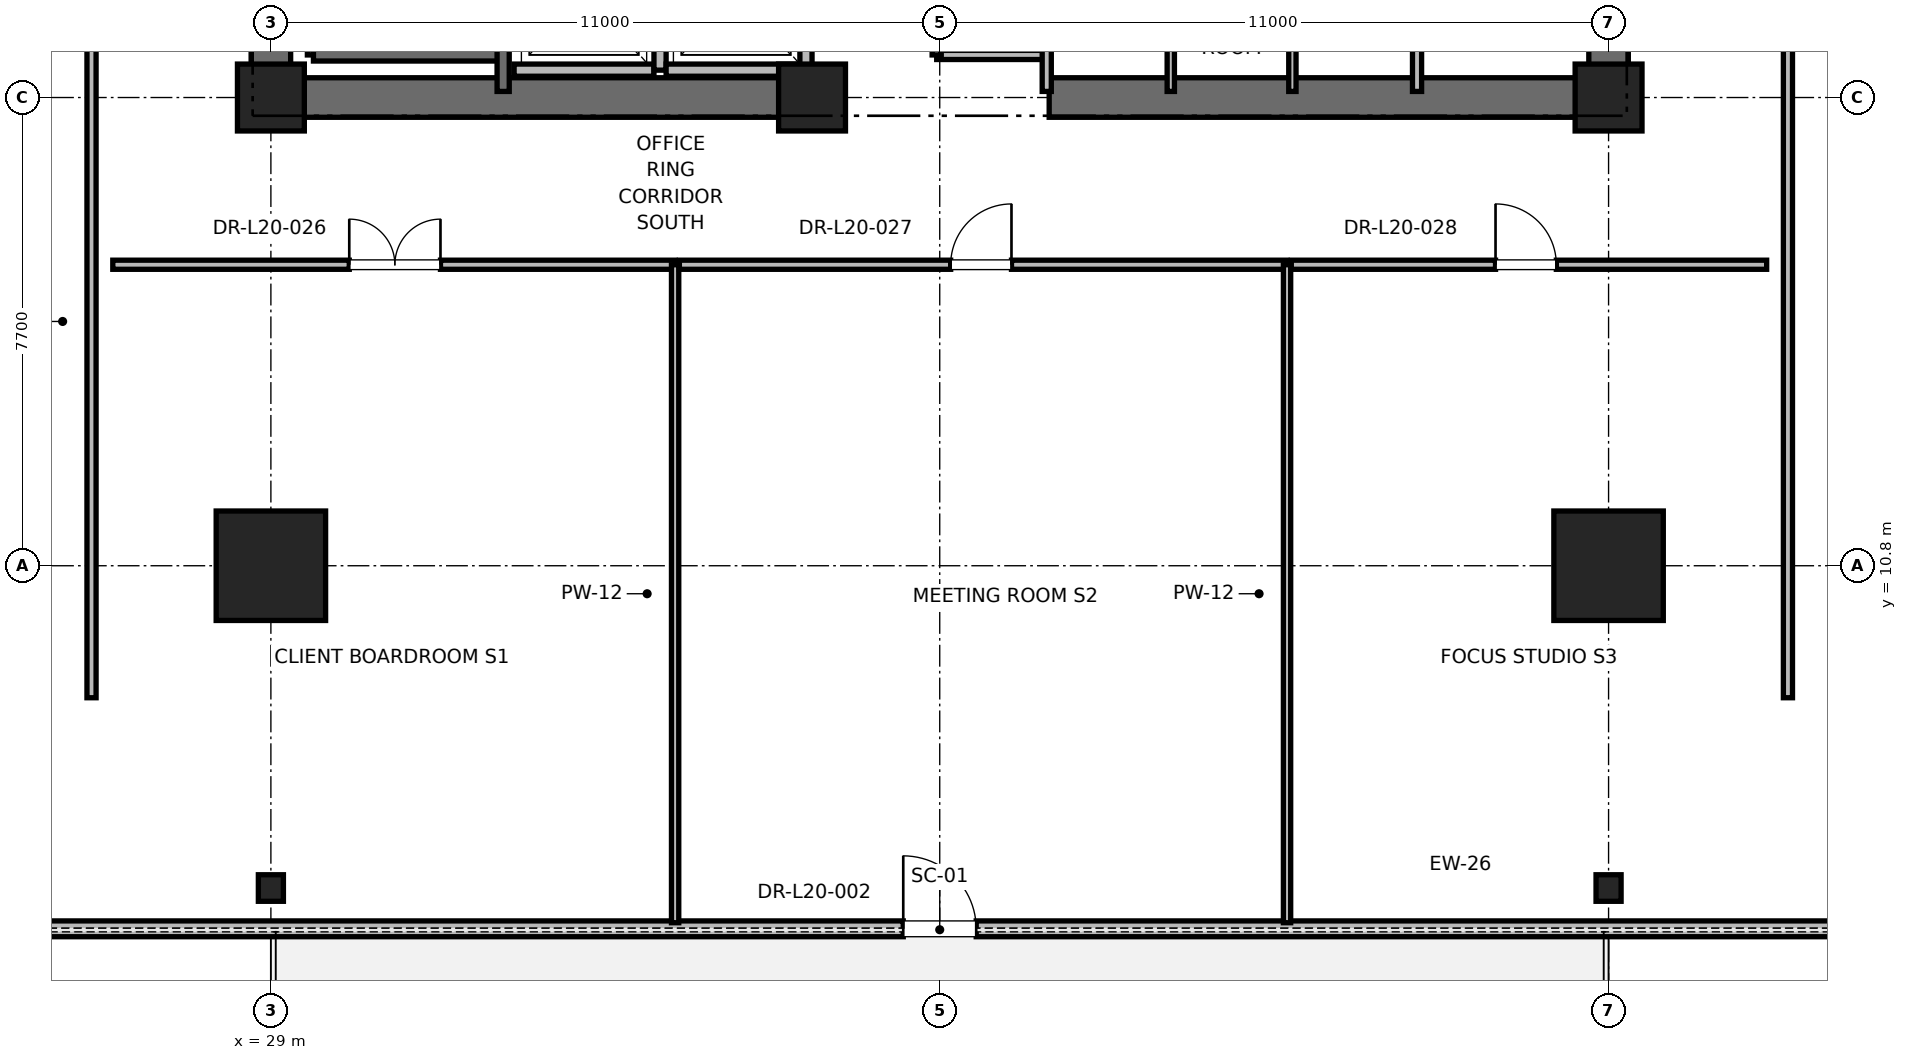
"""IFC4 building model, lengths in metres.
Left out: names, types, materials, properties, quantities, classifications, styles, units other than length and angle.
Written with IfcOpenShell. Run it as: python <this file> out.ifc"""

import sys

from ifc_helpers import new_model, si_unit, direction, frame, frame_2d, origin, origin_2d, place, context, subcontext, project, spatial, rectangle, i_section, extrude, element, fill, save


model = new_model("IFC4")
c1 = context("Model", 3, precision=1e-05, world=origin(), true_north=direction((0.0, 1.0)))
c2 = subcontext(c1, "Body", "Model", "MODEL_VIEW")
j1 = project(units=[si_unit("LENGTHUNIT", "METRE"), si_unit("PLANEANGLEUNIT", "RADIAN")], contexts=[c1])
p1 = place(None, origin())
s1 = spatial("IfcSite", under=j1, at=p1, CompositionType="ELEMENT")
p2 = place(p1, origin())
s2 = spatial("IfcBuilding", under=s1, at=p2, CompositionType="ELEMENT")
p3 = place(p2, frame((0.0, 0.0, 87.6)))
s3 = spatial("IfcBuildingStorey", under=s2, at=p3, CompositionType="ELEMENT", Elevation=87.6)
for number, where, z_axis, x_axis in (
    (1, (29.0, 10.8, 0.0), (0.0, 0.0, 1.0), (1.0, 0.0, 0.0)),
    (2, (51.0, 10.8, 0.0), (0.0, 0.0, 1.0), (1.0, 0.0, 0.0)),
):
    element("IfcColumn", number, at=place(p3, frame(where, z_axis=z_axis, x_axis=x_axis)), inside=s3, PredefinedType="COLUMN", context=c2, shape_type="SweptSolid", body=[
        extrude(rectangle(XDim=1.8, YDim=1.8, at=origin_2d()), origin(), (0.0, 0.0, 1.0), 4.0),
    ])
for number, where, z_axis, x_axis in (
    (3, (29.0, 5.5, 0.0), (0.0, 0.0, 1.0), (1.0, 0.0, 0.0)),
    (4, (51.0, 5.5, 0.0), (0.0, 0.0, 1.0), (1.0, 0.0, 0.0)),
):
    element("IfcColumn", number, at=place(p3, frame(where, z_axis=z_axis, x_axis=x_axis)), inside=s3, PredefinedType="COLUMN", context=c2, shape_type="SweptSolid", body=[
        extrude(i_section(OverallWidth=0.412, OverallDepth=0.437, WebThickness=0.036, FlangeThickness=0.058, FilletRadius=0.015, at=origin_2d()), origin(), (0.0, 0.0, 1.0), 4.0),
    ])
for number, where, z_axis, x_axis in (
    (5, (29.0, 18.5, 0.0), (0.0, 0.0, 1.0), (1.0, 0.0, 0.0)),
    (6, (51.0, 18.5, 0.0), (0.0, 0.0, 1.0), (1.0, 0.0, 0.0)),
    (7, (37.9, 18.5, 0.0), (0.0, 0.0, 1.0), (1.0, 0.0, 0.0)),
):
    element("IfcColumn", number, at=place(p3, frame(where, z_axis=z_axis, x_axis=x_axis)), inside=s3, PredefinedType="PILASTER", context=c2, shape_type="SweptSolid", body=[
        extrude(rectangle(XDim=1.1, YDim=1.1, at=origin_2d()), origin(), (0.0, 0.0, 1.0), 4.0),
    ])
for number, where, z_axis, x_axis in (
    (8, (29.0, 18.5, 0.0), (0.0, 0.0, 1.0), (1.0, 0.0, 0.0)),
    (9, (41.8, 18.5, 0.0), (0.0, 0.0, 1.0), (1.0, 0.0, 0.0)),
):
    element("IfcWall", number, at=place(p3, frame(where, z_axis=z_axis, x_axis=x_axis)), inside=s3, PredefinedType="SHEAR", context=c2, shape_type="SweptSolid", body=[
        extrude(rectangle(XDim=9.2, YDim=0.65, at=frame_2d((4.6, 0.0))), origin(), (0.0, 0.0, 1.0), 3.76),
    ])
p4 = place(p3, frame((29.0, 18.5, 0.0), z_axis=(0.0, 0.0, 1.0), x_axis=(0.0, 1.0, 0.0)))
e10 = element("IfcWall", 10, at=p4, inside=s3, PredefinedType="SHEAR", context=c2, shape_type="SweptSolid", body=[
    extrude(rectangle(XDim=8.8, YDim=0.65, at=frame_2d((4.4, 0.0))), origin(), (0.0, 0.0, 1.0), 3.76),
])
p5 = place(p3, frame((51.0, 18.5, 0.0), z_axis=(0.0, 0.0, 1.0), x_axis=(0.0, 1.0, 0.0)))
e11 = element("IfcWall", 11, at=p5, inside=s3, PredefinedType="SHEAR", context=c2, shape_type="SweptSolid", body=[
    extrude(rectangle(XDim=5.8, YDim=0.65, at=frame_2d((2.9, 0.0))), origin(), (0.0, 0.0, 1.0), 3.76),
])
p6 = place(p3, frame((17.47, 4.829, 0.0), z_axis=(0.0, 0.0, 1.0), x_axis=(1.0, 0.0, 0.0)))
e12 = element("IfcWall", 12, at=p6, inside=s3, PredefinedType="PARAPET", context=c2, shape_type="SweptSolid", body=[
    extrude(rectangle(XDim=45.06, YDim=0.26, at=frame_2d((22.53, 0.0))), origin(), (0.0, 0.0, 1.0), 3.273),
])
p7 = place(p6, frame((4.2, 0.0, 0.85)))
e13 = element("IfcOpeningElement", 13, at=p7, cuts=e12, PredefinedType="OPENING", context=c2, shape_type="SweptSolid", body=[
    extrude(rectangle(XDim=1.8, YDim=2.2, at=frame_2d((0.9, 1.1))), frame((0.0, 0.13, 0.0), z_axis=(0.0, -1.0, 0.0), x_axis=(1.0, 0.0, 0.0)), (0.0, 0.0, 1.0), 0.26),
])
p8 = place(p6, frame((21.93, 0.0, 0.0)))
e14 = element("IfcOpeningElement", 14, at=p8, cuts=e12, PredefinedType="OPENING", context=c2, shape_type="SweptSolid", body=[
    extrude(rectangle(XDim=1.2, YDim=2.2, at=frame_2d((0.6, 1.1))), frame((0.0, 0.13, 0.0), z_axis=(0.0, -1.0, 0.0), x_axis=(1.0, 0.0, 0.0)), (0.0, 0.0, 1.0), 0.26),
])
p9 = place(p6, frame((39.06, 0.0, 0.85)))
e15 = element("IfcOpeningElement", 15, at=p9, cuts=e12, PredefinedType="OPENING", context=c2, shape_type="SweptSolid", body=[
    extrude(rectangle(XDim=1.8, YDim=2.2, at=frame_2d((0.9, 1.1))), frame((0.0, 0.13, 0.0), z_axis=(0.0, -1.0, 0.0), x_axis=(1.0, 0.0, 0.0)), (0.0, 0.0, 1.0), 0.26),
])
p10 = place(p3, frame((29.7, 19.2, 0.0), z_axis=(0.0, 0.0, 1.0), x_axis=(0.0, 1.0, 0.0)))
e16 = element("IfcWall", 16, at=p10, inside=s3, PredefinedType="SOLIDWALL", context=c2, shape_type="SweptSolid", body=[
    extrude(rectangle(XDim=8.15, YDim=0.2, at=frame_2d((4.075, 0.0))), origin(), (0.0, 0.0, 1.0), 3.76),
])
p11 = place(p3, frame((29.7, 19.2, 0.0), z_axis=(0.0, 0.0, 1.0), x_axis=(1.0, 0.0, 0.0)))
e17 = element("IfcWall", 17, at=p11, inside=s3, PredefinedType="SOLIDWALL", context=c2, shape_type="SweptSolid", body=[
    extrude(rectangle(XDim=3.12, YDim=0.2, at=frame_2d((1.56, 0.0))), origin(), (0.0, 0.0, 1.0), 3.76),
])
p12 = place(p3, frame((32.82, 18.6, 0.0), z_axis=(0.0, 0.0, 1.0), x_axis=(0.0, 1.0, 0.0)))
e18 = element("IfcWall", 18, at=p12, inside=s3, PredefinedType="SOLIDWALL", context=c2, shape_type="SweptSolid", body=[
    extrude(rectangle(XDim=8.78, YDim=0.2, at=frame_2d((4.39, 0.0))), origin(), (0.0, 0.0, 1.0), 3.76),
])
p13 = place(p3, frame((33.0, 18.95, 0.0), z_axis=(0.0, 0.0, 1.0), x_axis=(1.0, 0.0, 0.0)))
e19 = element("IfcWall", 19, at=p13, inside=s3, PredefinedType="SOLIDWALL", context=c2, shape_type="SweptSolid", body=[
    extrude(rectangle(XDim=2.3, YDim=0.2, at=frame_2d((1.15, 0.0))), origin(), (0.0, 0.0, 1.0), 3.76),
])
p14 = place(p3, frame((35.4, 18.95, 0.0), z_axis=(0.0, 0.0, 1.0), x_axis=(0.0, 1.0, 0.0)))
e20 = element("IfcWall", 20, at=p14, inside=s3, PredefinedType="SOLIDWALL", context=c2, shape_type="SweptSolid", body=[
    extrude(rectangle(XDim=2.6, YDim=0.2, at=frame_2d((1.3, 0.0))), origin(), (0.0, 0.0, 1.0), 3.76),
])
p15 = place(p3, frame((35.5, 18.95, 0.0), z_axis=(0.0, 0.0, 1.0), x_axis=(1.0, 0.0, 0.0)))
e21 = element("IfcWall", 21, at=p15, inside=s3, PredefinedType="SOLIDWALL", context=c2, shape_type="SweptSolid", body=[
    extrude(rectangle(XDim=2.3, YDim=0.2, at=frame_2d((1.15, 0.0))), origin(), (0.0, 0.0, 1.0), 2.54),
])
p16 = place(p3, frame((37.8, 18.95, 0.0), z_axis=(0.0, 0.0, 1.0), x_axis=(0.0, 1.0, 0.0)))
e22 = element("IfcWall", 22, at=p16, inside=s3, PredefinedType="SOLIDWALL", context=c2, shape_type="SweptSolid", body=[
    extrude(rectangle(XDim=2.6, YDim=0.2, at=frame_2d((1.3, 0.0))), origin(), (0.0, 0.0, 1.0), 2.54),
])
p17 = place(p3, frame((39.95, 19.2, 0.0), z_axis=(0.0, 0.0, 1.0), x_axis=(1.0, 0.0, 0.0)))
e23 = element("IfcWall", 23, at=p17, inside=s3, PredefinedType="PARTITIONING", context=c2, shape_type="SweptSolid", body=[
    extrude(rectangle(XDim=1.81, YDim=0.15, at=frame_2d((0.905, 0.0))), origin(), (0.0, 0.0, 1.0), 2.85),
])
p18 = place(p3, frame((41.76, 18.6, 0.0), z_axis=(0.0, 0.0, 1.0), x_axis=(0.0, 1.0, 0.0)))
e24 = element("IfcWall", 24, at=p18, inside=s3, PredefinedType="PARTITIONING", context=c2, shape_type="SweptSolid", body=[
    extrude(rectangle(XDim=3.6, YDim=0.15, at=frame_2d((1.8, 0.0))), origin(), (0.0, 0.0, 1.0), 2.54),
])
p19 = place(p3, frame((39.95, 19.2, 0.0), z_axis=(0.0, 0.0, 1.0), x_axis=(0.0, 1.0, 0.0)))
e25 = element("IfcWall", 25, at=p19, inside=s3, PredefinedType="PARTITIONING", context=c2, shape_type="SweptSolid", body=[
    extrude(rectangle(XDim=3.0, YDim=0.15, at=frame_2d((1.5, 0.0))), origin(), (0.0, 0.0, 1.0), 2.85),
])
p20 = place(p19, frame((1.05, 0.0, 0.0)))
e26 = element("IfcOpeningElement", 26, at=p20, cuts=e25, PredefinedType="OPENING", context=c2, shape_type="SweptSolid", body=[
    extrude(rectangle(XDim=0.9, YDim=2.1, at=frame_2d((0.45, 1.05))), frame((0.0, 0.075, 0.0), z_axis=(0.0, -1.0, 0.0), x_axis=(1.0, 0.0, 0.0)), (0.0, 0.0, 1.0), 0.15),
])
p21 = place(p3, frame((47.85, 18.6, 0.0), z_axis=(0.0, 0.0, 1.0), x_axis=(0.0, 1.0, 0.0)))
e27 = element("IfcWall", 27, at=p21, inside=s3, PredefinedType="PARTITIONING", context=c2, shape_type="SweptSolid", body=[
    extrude(rectangle(XDim=2.54, YDim=0.15, at=frame_2d((1.27, 0.0))), origin(), (0.0, 0.0, 1.0), 2.85),
])
for number, where, z_axis, x_axis in (
    (28, (43.8, 18.6, 0.0), (0.0, 0.0, 1.0), (0.0, 1.0, 0.0)),
    (29, (45.8, 18.6, 0.0), (0.0, 0.0, 1.0), (0.0, 1.0, 0.0)),
):
    element("IfcWall", number, at=place(p3, frame(where, z_axis=z_axis, x_axis=x_axis)), inside=s3, PredefinedType="PARTITIONING", context=c2, shape_type="SweptSolid", body=[
        extrude(rectangle(XDim=3.02, YDim=0.12, at=frame_2d((1.51, 0.0))), origin(), (0.0, 0.0, 1.0), 2.85),
    ])
p22 = place(p3, frame((26.4, 15.75, 0.0), z_axis=(0.0, 0.0, 1.0), x_axis=(1.0, 0.0, 0.0)))
e30 = element("IfcWall", 30, at=p22, inside=s3, PredefinedType="PARTITIONING", context=c2, shape_type="SweptSolid", body=[
    extrude(rectangle(XDim=9.248, YDim=0.15, at=frame_2d((4.624, 0.0))), origin(), (0.0, 0.0, 1.0), 2.85),
])
p23 = place(p22, frame((3.889, 0.0, 0.0)))
e31 = element("IfcOpeningElement", 31, at=p23, cuts=e30, PredefinedType="OPENING", context=c2, shape_type="SweptSolid", body=[
    extrude(rectangle(XDim=1.5, YDim=2.25, at=frame_2d((0.75, 1.125))), frame((0.0, 0.075, 0.0), z_axis=(0.0, -1.0, 0.0), x_axis=(1.0, 0.0, 0.0)), (0.0, 0.0, 1.0), 0.15),
])
p24 = place(p3, frame((35.648, 4.929, 0.0), z_axis=(0.0, 0.0, 1.0), x_axis=(0.0, 1.0, 0.0)))
e32 = element("IfcWall", 32, at=p24, inside=s3, PredefinedType="PARTITIONING", context=c2, shape_type="SweptSolid", body=[
    extrude(rectangle(XDim=10.821, YDim=0.12, at=frame_2d((5.41, 0.0))), origin(), (0.0, 0.0, 1.0), 2.39),
])
p25 = place(p3, frame((35.718, 15.75, 0.0), z_axis=(0.0, 0.0, 1.0), x_axis=(1.0, 0.0, 0.0)))
e33 = element("IfcWall", 33, at=p25, inside=s3, PredefinedType="PARTITIONING", context=c2, shape_type="SweptSolid", body=[
    extrude(rectangle(XDim=9.994, YDim=0.15, at=frame_2d((4.997, 0.0))), origin(), (0.0, 0.0, 1.0), 2.85),
])
p26 = place(p25, frame((4.462, 0.0, 0.0)))
e34 = element("IfcOpeningElement", 34, at=p26, cuts=e33, PredefinedType="OPENING", context=c2, shape_type="SweptSolid", body=[
    extrude(rectangle(XDim=1.0, YDim=2.15, at=frame_2d((0.5, 1.075))), frame((0.0, 0.075, 0.0), z_axis=(0.0, -1.0, 0.0), x_axis=(1.0, 0.0, 0.0)), (0.0, 0.0, 1.0), 0.15),
])
p27 = place(p3, frame((45.712, 4.929, 0.0), z_axis=(0.0, 0.0, 1.0), x_axis=(0.0, 1.0, 0.0)))
e35 = element("IfcWall", 35, at=p27, inside=s3, PredefinedType="PARTITIONING", context=c2, shape_type="SweptSolid", body=[
    extrude(rectangle(XDim=10.821, YDim=0.12, at=frame_2d((5.41, 0.0))), origin(), (0.0, 0.0, 1.0), 2.39),
])
p28 = place(p3, frame((45.782, 15.75, 0.0), z_axis=(0.0, 0.0, 1.0), x_axis=(1.0, 0.0, 0.0)))
e36 = element("IfcWall", 36, at=p28, inside=s3, PredefinedType="PARTITIONING", context=c2, shape_type="SweptSolid", body=[
    extrude(rectangle(XDim=7.818, YDim=0.15, at=frame_2d((3.909, 0.0))), origin(), (0.0, 0.0, 1.0), 2.85),
])
p29 = place(p28, frame((3.359, 0.0, 0.0)))
e37 = element("IfcOpeningElement", 37, at=p29, cuts=e36, PredefinedType="OPENING", context=c2, shape_type="SweptSolid", body=[
    extrude(rectangle(XDim=1.0, YDim=2.15, at=frame_2d((0.5, 1.075))), frame((0.0, 0.075, 0.0), z_axis=(0.0, -1.0, 0.0), x_axis=(1.0, 0.0, 0.0)), (0.0, 0.0, 1.0), 0.15),
])
p30 = place(p3, frame((26.05, 8.629, 0.0), z_axis=(0.0, 0.0, 1.0), x_axis=(0.0, 1.0, 0.0)))
e38 = element("IfcWall", 38, at=p30, inside=s3, PredefinedType="PARTITIONING", context=c2, shape_type="SweptSolid", body=[
    extrude(rectangle(XDim=15.852, YDim=0.15, at=frame_2d((7.926, 0.0))), origin(), (0.0, 0.0, 1.0), 2.85),
])
p31 = place(p30, frame((12.376, 0.0, 0.0)))
e39 = element("IfcOpeningElement", 39, at=p31, cuts=e38, PredefinedType="OPENING", context=c2, shape_type="SweptSolid", body=[
    extrude(rectangle(XDim=1.0, YDim=2.15, at=frame_2d((0.5, 1.075))), frame((0.0, 0.075, 0.0), z_axis=(0.0, -1.0, 0.0), x_axis=(1.0, 0.0, 0.0)), (0.0, 0.0, 1.0), 0.15),
])
p32 = place(p3, frame((53.95, 8.629, 0.0), z_axis=(0.0, 0.0, 1.0), x_axis=(0.0, 1.0, 0.0)))
e40 = element("IfcWall", 40, at=p32, inside=s3, PredefinedType="PARTITIONING", context=c2, shape_type="SweptSolid", body=[
    extrude(rectangle(XDim=21.89, YDim=0.15, at=frame_2d((10.945, 0.0))), origin(), (0.0, 0.0, 1.0), 2.85),
])
p33 = place(p32, frame((15.396, 0.0, 0.0)))
e41 = element("IfcOpeningElement", 41, at=p33, cuts=e40, PredefinedType="OPENING", context=c2, shape_type="SweptSolid", body=[
    extrude(rectangle(XDim=1.0, YDim=2.15, at=frame_2d((0.5, 1.075))), frame((0.0, 0.075, 0.0), z_axis=(0.0, -1.0, 0.0), x_axis=(1.0, 0.0, 0.0)), (0.0, 0.0, 1.0), 0.15),
])
p34 = place(p8, origin())
e42 = element("IfcDoor", 42, at=p34, inside=s3, OperationType="SINGLE_SWING_LEFT", PredefinedType="DOOR", context=c2, shape_type="SweptSolid", body=[
    extrude(rectangle(XDim=1.2, YDim=2.2, at=frame_2d((0.6, 1.1))), frame((0.0, 0.025, 0.0), z_axis=(0.0, -1.0, 0.0), x_axis=(1.0, 0.0, 0.0)), (0.0, 0.0, 1.0), 0.05),
])
fill(e14, e42)
p35 = place(p23, origin())
e43 = element("IfcDoor", 43, at=p35, inside=s3, OperationType="DOUBLE_DOOR_SINGLE_SWING", PredefinedType="DOOR", context=c2, shape_type="SweptSolid", body=[
    extrude(rectangle(XDim=1.5, YDim=2.25, at=frame_2d((0.75, 1.125))), frame((0.0, 0.025, 0.0), z_axis=(0.0, -1.0, 0.0), x_axis=(1.0, 0.0, 0.0)), (0.0, 0.0, 1.0), 0.05),
])
fill(e31, e43)
p36 = place(p26, origin())
e44 = element("IfcDoor", 44, at=p36, inside=s3, OperationType="SINGLE_SWING_RIGHT", PredefinedType="DOOR", context=c2, shape_type="SweptSolid", body=[
    extrude(rectangle(XDim=1.0, YDim=2.15, at=frame_2d((0.5, 1.075))), frame((0.0, 0.025, 0.0), z_axis=(0.0, -1.0, 0.0), x_axis=(1.0, 0.0, 0.0)), (0.0, 0.0, 1.0), 0.05),
])
fill(e34, e44)
p37 = place(p29, origin())
e45 = element("IfcDoor", 45, at=p37, inside=s3, OperationType="SINGLE_SWING_LEFT", PredefinedType="DOOR", context=c2, shape_type="SweptSolid", body=[
    extrude(rectangle(XDim=1.0, YDim=2.15, at=frame_2d((0.5, 1.075))), frame((0.0, 0.025, 0.0), z_axis=(0.0, -1.0, 0.0), x_axis=(1.0, 0.0, 0.0)), (0.0, 0.0, 1.0), 0.05),
])
fill(e37, e45)
save(model, sys.argv[1])
